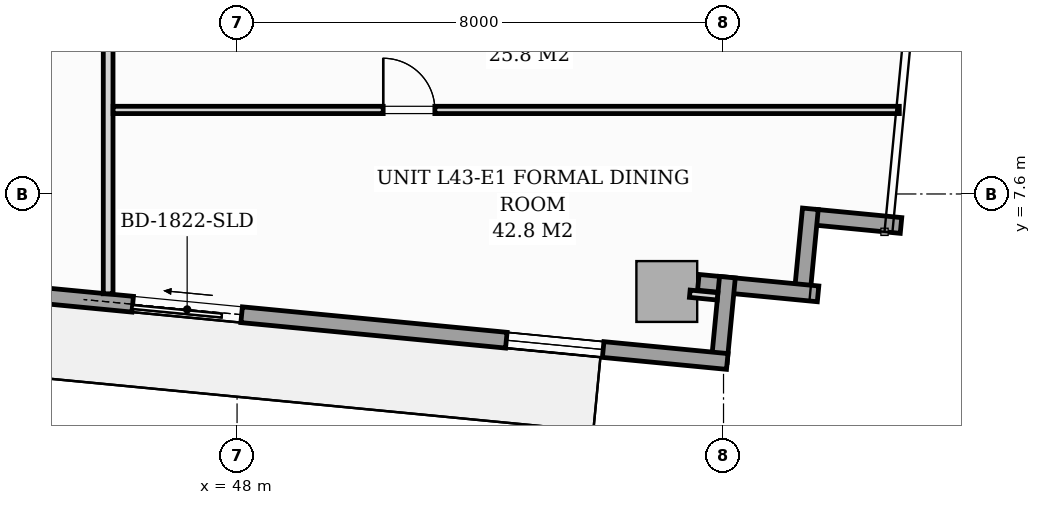
"""IFC4 building model, lengths in metres.
Left out: names, types, materials, properties, quantities, classifications, styles, units other than length and angle.
Written with IfcOpenShell. Run it as: python <this file> out.ifc"""

import sys

from ifc_helpers import new_model, si_unit, direction, frame, frame_2d, origin, origin_2d, place, context, subcontext, project, spatial, rectangle, extrude, source, transform, mapped, element, fill, save


model = new_model("IFC4")
c1 = context("Model", 3, precision=1e-05, world=origin(), true_north=direction((0.0, 1.0)))
c2 = subcontext(c1, "Body", "Model", "MODEL_VIEW")
j1 = project(units=[si_unit("LENGTHUNIT", "METRE"), si_unit("PLANEANGLEUNIT", "RADIAN")], contexts=[c1])
p1 = place(None, origin())
s1 = spatial("IfcSite", under=j1, at=p1, CompositionType="ELEMENT")
p2 = place(p1, origin())
s2 = spatial("IfcBuilding", under=s1, at=p2, CompositionType="ELEMENT")
p3 = place(p2, frame((0.0, 0.0, 150.2)))
s3 = spatial("IfcBuildingStorey", under=s2, at=p3, CompositionType="ELEMENT", Elevation=150.2)
m1 = source(origin(), c2, "Body", "SweptSolid", [
    extrude(rectangle(XDim=1.0, YDim=1.0, at=origin_2d()), origin(), (0.0, 0.0, 1.0), 3.196),
])
p4 = place(p3, frame((55.067, 5.996, 0.002), z_axis=(0.0, 0.0, 1.0), x_axis=(0.995396198367, -0.09584575252, 0.0)))
e1 = element("IfcColumn", 1, at=p4, inside=s3, PredefinedType="COLUMN", context=c2, shape_type="MappedRepresentation", body=[
    mapped(m1, transform((0.0, 0.0, 0.0), scale=1.0)),
])
for number, where, z_axis, x_axis in (
    (2, (58.919, 7.082, 0.0), (0.0, 0.0, 1.0), (-0.995, 0.096, 0.0)),
    (3, (57.428, 7.356, 0.0), (0.0, 0.0, 1.0), (-0.096, -0.995, 0.0)),
):
    element("IfcWall", number, at=place(p3, frame(where, z_axis=z_axis, x_axis=x_axis)), inside=s3, PredefinedType="STANDARD", context=c2, shape_type="SweptSolid", body=[
        extrude(rectangle(XDim=1.395, YDim=0.26, at=frame_2d((0.697, 0.0))), origin(), (0.0, 0.0, 1.0), 2.94),
    ])
p5 = place(p3, frame((57.555, 5.958, 0.0), z_axis=(0.0, 0.0, 1.0), x_axis=(-0.995401789159, 0.095787672171, 0.0)))
e4 = element("IfcWall", 4, at=p5, inside=s3, PredefinedType="STANDARD", context=c2, shape_type="SweptSolid", body=[
    extrude(rectangle(XDim=1.978, YDim=0.26, at=frame_2d((0.989, 0.0))), origin(), (0.0, 0.0, 1.0), 2.94),
])
p6 = place(p3, frame((56.064, 6.232, 0.0), z_axis=(0.0, 0.0, 1.0), x_axis=(-0.09589913835, -0.995391056452, 0.0)))
e5 = element("IfcWall", 5, at=p6, inside=s3, PredefinedType="STANDARD", context=c2, shape_type="SweptSolid", body=[
    extrude(rectangle(XDim=1.395, YDim=0.26, at=frame_2d((0.698, 0.0))), origin(), (0.0, 0.0, 1.0), 2.94),
])
p7 = place(p3, frame((56.061, 4.845, 0.0), z_axis=(0.0, 0.0, 1.0), x_axis=(-0.995395976631, 0.095848055311, 0.0)))
e6 = element("IfcWall", 6, at=p7, inside=s3, PredefinedType="STANDARD", context=c2, shape_type="SweptSolid", body=[
    extrude(rectangle(XDim=17.01, YDim=0.26, at=frame_2d((8.505, 0.0))), origin(), (0.0, 0.0, 1.0), 2.94),
])
p8 = place(p7, frame((8.023, 0.0, 0.0)))
e7 = element("IfcOpeningElement", 7, at=p8, cuts=e6, PredefinedType="OPENING", context=c2, shape_type="SweptSolid", body=[
    extrude(rectangle(XDim=1.8, YDim=2.06, at=frame_2d((0.9, 1.03))), frame((0.0, 0.14, 0.0), z_axis=(0.0, -1.0, 0.0), x_axis=(1.0, 0.0, 0.0)), (0.0, 0.0, 1.0), 0.28),
])
p9 = place(p7, frame((2.05, 0.0, 0.65)))
e8 = element("IfcOpeningElement", 8, at=p9, cuts=e6, PredefinedType="OPENING", context=c2, shape_type="SweptSolid", body=[
    extrude(rectangle(XDim=1.6, YDim=1.5, at=frame_2d((0.8, 0.75))), frame((0.0, 0.14, 0.0), z_axis=(0.0, -1.0, 0.0), x_axis=(1.0, 0.0, 0.0)), (0.0, 0.0, 1.0), 0.28),
])
p10 = place(p7, frame((12.952, 0.0, 0.75)))
e9 = element("IfcOpeningElement", 9, at=p10, cuts=e6, PredefinedType="OPENING", context=c2, shape_type="SweptSolid", body=[
    extrude(rectangle(XDim=1.6, YDim=1.5, at=frame_2d((0.8, 0.75))), frame((0.0, 0.14, 0.0), z_axis=(0.0, -1.0, 0.0), x_axis=(1.0, 0.0, 0.0)), (0.0, 0.0, 1.0), 0.28),
])
p11 = place(p3, frame((45.88, 5.958, 0.0), z_axis=(0.0, 0.0, 1.0), x_axis=(0.0, 1.0, 0.0)))
e10 = element("IfcWall", 10, at=p11, inside=s3, PredefinedType="PARTITIONING", context=c2, shape_type="SweptSolid", body=[
    extrude(rectangle(XDim=6.51, YDim=0.16, at=frame_2d((3.255, 0.0))), origin(), (0.0, 0.0, 1.0), 2.94),
])
p12 = place(p3, frame((45.962, 8.982, 0.0), z_axis=(0.0, 0.0, 1.0), x_axis=(1.0, 0.0, 0.0)))
e11 = element("IfcWall", 11, at=p12, inside=s3, PredefinedType="PARTITIONING", context=c2, shape_type="SweptSolid", body=[
    extrude(rectangle(XDim=12.929, YDim=0.12, at=frame_2d((6.464, 0.0))), origin(), (0.0, 0.0, 1.0), 2.94),
])
p13 = place(p12, frame((4.441, 0.0, 0.0)))
e12 = element("IfcOpeningElement", 12, at=p13, cuts=e11, PredefinedType="OPENING", context=c2, shape_type="SweptSolid", body=[
    extrude(rectangle(XDim=0.85, YDim=2.05, at=frame_2d((0.425, 1.025))), frame((0.0, 0.07, 0.0), z_axis=(0.0, -1.0, 0.0), x_axis=(1.0, 0.0, 0.0)), (0.0, 0.0, 1.0), 0.14),
])
p14 = place(p3, frame((55.445, 5.96, 0.0), z_axis=(0.0, 0.0, 1.0), x_axis=(0.995384576284, -0.09596637586, 0.0)))
e13 = element("IfcWall", 13, at=p14, inside=s3, PredefinedType="PARTITIONING", context=c2, shape_type="SweptSolid", body=[
    extrude(rectangle(XDim=0.458, YDim=0.12, at=frame_2d((0.229, 0.0))), origin(), (0.0, 0.0, 1.0), 2.94),
])
m2 = source(origin(), c2, "Body", "SweptSolid", [
    extrude(rectangle(XDim=1.8, YDim=2.06, at=frame_2d((0.9, 1.03))), frame((0.0, 0.025, 0.0), z_axis=(0.0, -1.0, 0.0), x_axis=(1.0, 0.0, 0.0)), (0.0, 0.0, 1.0), 0.05),
])
p15 = place(p8, origin())
e14 = element("IfcDoor", 14, at=p15, inside=s3, OperationType="SLIDING_TO_RIGHT", PredefinedType="DOOR", context=c2, shape_type="MappedRepresentation", body=[
    mapped(m2, transform((0.0, 0.0, 0.0), scale=1.0)),
])
fill(e7, e14)
m3 = source(origin(), c2, "Body", "SweptSolid", [
    extrude(rectangle(XDim=1.6, YDim=1.5, at=frame_2d((0.8, 0.75))), frame((0.0, 0.03, 0.0), z_axis=(0.0, -1.0, 0.0), x_axis=(1.0, 0.0, 0.0)), (0.0, 0.0, 1.0), 0.06),
])
p16 = place(p9, origin())
e15 = element("IfcWindow", 15, at=p16, inside=s3, PartitioningType="SINGLE_PANEL", PredefinedType="WINDOW", context=c2, shape_type="MappedRepresentation", body=[
    mapped(m3, transform((0.0, 0.0, 0.0), scale=1.0)),
])
fill(e8, e15)
m4 = source(origin(), c2, "Body", "SweptSolid", [
    extrude(rectangle(XDim=0.85, YDim=2.05, at=frame_2d((0.425, 1.025))), frame((0.0, 0.025, 0.0), z_axis=(0.0, -1.0, 0.0), x_axis=(1.0, 0.0, 0.0)), (0.0, 0.0, 1.0), 0.05),
])
p17 = place(p13, origin())
e16 = element("IfcDoor", 16, at=p17, inside=s3, OperationType="SINGLE_SWING_LEFT", PredefinedType="DOOR", context=c2, shape_type="MappedRepresentation", body=[
    mapped(m4, transform((0.0, 0.0, 0.0), scale=1.0)),
])
fill(e12, e16)
save(model, sys.argv[1])
